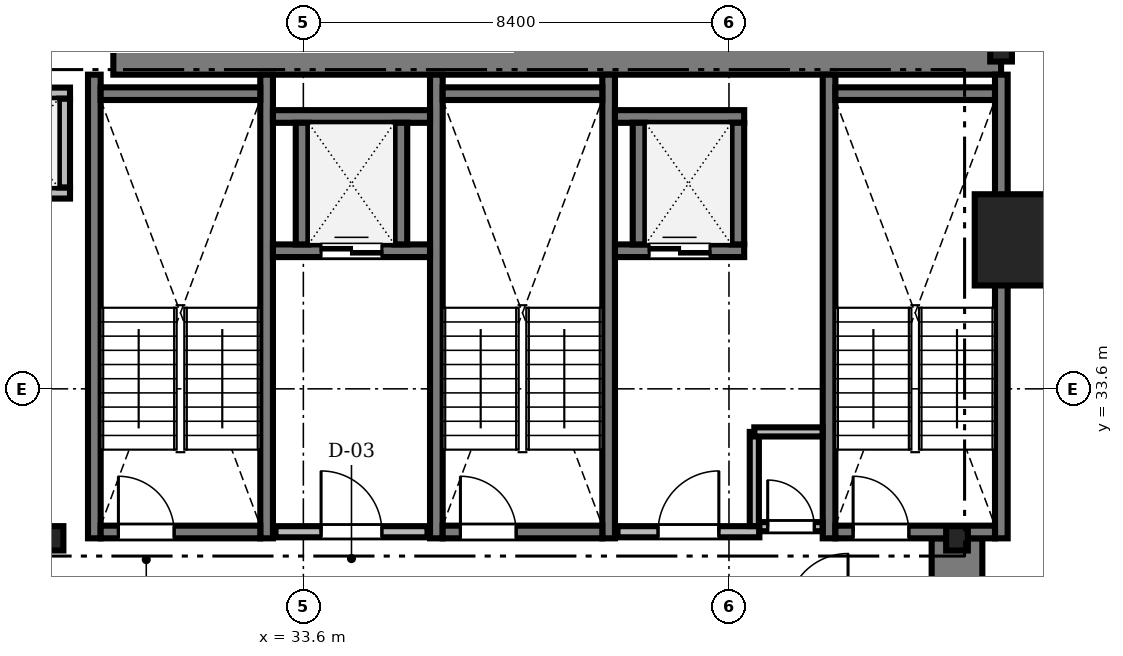
"""IFC4 building model, lengths in metres.
Left out: names, types, materials, properties, quantities, classifications, styles, units other than length and angle.
Written with IfcOpenShell. Run it as: python <this file> out.ifc"""

import sys

from ifc_helpers import new_model, si_unit, direction, frame, frame_2d, origin, origin_2d, place, context, subcontext, project, spatial, rectangle, i_section, extrude, source, transform, mapped, element, fill, save


model = new_model("IFC4")
c1 = context("Model", 3, precision=1e-05, world=origin(), true_north=direction((0.0, 1.0)))
c2 = subcontext(c1, "Body", "Model", "MODEL_VIEW")
j1 = project(units=[si_unit("LENGTHUNIT", "METRE"), si_unit("PLANEANGLEUNIT", "RADIAN")], contexts=[c1])
p1 = place(None, origin())
s1 = spatial("IfcSite", under=j1, at=p1, CompositionType="ELEMENT")
p2 = place(p1, origin())
s2 = spatial("IfcBuilding", under=s1, at=p2, CompositionType="ELEMENT")
p3 = place(p2, frame((0.0, 0.0, 45.85)))
s3 = spatial("IfcBuildingStorey", under=s2, at=p3, CompositionType="ELEMENT", Elevation=45.85)
m1 = source(origin(), c2, "Body", "SweptSolid", [
    extrude(rectangle(XDim=17.52, YDim=1.0, at=frame_2d((8.76, 0.0))), origin(), (0.0, 0.0, 1.0), 3.41),
])
p4 = place(p3, frame((29.85, 40.3, 0.0), z_axis=(0.0, 0.0, 1.0), x_axis=(1.0, 0.0, 0.0)))
e1 = element("IfcWall", 1, at=p4, inside=s3, PredefinedType="SHEAR", context=c2, shape_type="MappedRepresentation", body=[
    mapped(m1, transform((0.0, 0.0, 0.0), scale=1.0)),
])
m2 = source(origin(), c2, "Body", "SweptSolid", [
    extrude(rectangle(XDim=13.15, YDim=1.0, at=frame_2d((6.575, 0.0))), origin(), (0.0, 0.0, 1.0), 3.41),
])
p5 = place(p3, frame((46.5, 17.5, 0.0), z_axis=(0.0, 0.0, 1.0), x_axis=(0.0, 1.0, 0.0)))
e2 = element("IfcWall", 2, at=p5, inside=s3, PredefinedType="SHEAR", context=c2, shape_type="MappedRepresentation", body=[
    mapped(m2, transform((0.0, 0.0, 0.0), scale=1.0)),
])
m3 = source(origin(), c2, "Body", "SweptSolid", [
    extrude(i_section(OverallWidth=0.428, OverallDepth=0.481, WebThickness=0.04, FlangeThickness=0.063, FilletRadius=0.015, at=origin_2d()), origin(), (0.0, 0.0, 1.0), 3.41),
])
for number, where, z_axis, x_axis in (
    (3, (28.65, 30.65, 0.0), (0.0, 0.0, 1.0), (1.0, 0.0, 0.0)),
    (4, (46.5, 30.65, 0.0), (0.0, 0.0, 1.0), (1.0, 0.0, 0.0)),
    (5, (47.37, 40.3, 0.0), (0.0, 0.0, 1.0), (1.0, 0.0, 0.0)),
):
    element("IfcColumn", number, at=place(p3, frame(where, z_axis=z_axis, x_axis=x_axis)), inside=s3, PredefinedType="COLUMN", context=c2, shape_type="MappedRepresentation", body=[
        mapped(m3, transform((0.0, 0.0, 0.0), scale=1.0)),
    ])
m4 = source(origin(), c2, "Body", "SweptSolid", [
    extrude(rectangle(XDim=1.8, YDim=1.8, at=origin_2d()), origin(), (0.0, 0.0, 1.0), 3.41),
])
p6 = place(p3, frame((47.75, 36.54, 0.0), z_axis=(0.0, 0.0, 1.0), x_axis=(1.0, 0.0, 0.0)))
e6 = element("IfcColumn", 6, at=p6, inside=s3, PredefinedType="COLUMN", context=c2, shape_type="MappedRepresentation", body=[
    mapped(m4, transform((0.0, 0.0, 0.0), scale=1.0)),
])
m5 = source(origin(), c2, "Body", "SweptSolid", [
    extrude(rectangle(XDim=9.15, YDim=0.25, at=frame_2d((4.575, 0.0))), origin(), (0.0, 0.0, 1.0), 3.45),
])
for number, where, z_axis, x_axis in (
    (7, (29.475, 30.65, 0.0), (0.0, 0.0, 1.0), (0.0, 1.0, 0.0)),
    (8, (32.875, 30.65, 0.0), (0.0, 0.0, 1.0), (0.0, 1.0, 0.0)),
):
    element("IfcWall", number, at=place(p3, frame(where, z_axis=z_axis, x_axis=x_axis)), inside=s3, PredefinedType="SOLIDWALL", context=c2, shape_type="MappedRepresentation", body=[
        mapped(m5, transform((0.0, 0.0, 0.0), scale=1.0)),
    ])
m6 = source(origin(), c2, "Body", "SweptSolid", [
    extrude(rectangle(XDim=3.15, YDim=0.25, at=frame_2d((1.575, 0.0))), origin(), (0.0, 0.0, 1.0), 3.45),
])
p7 = place(p3, frame((29.6, 39.425, 0.0), z_axis=(0.0, 0.0, 1.0), x_axis=(1.0, 0.0, 0.0)))
e9 = element("IfcWall", 9, at=p7, inside=s3, PredefinedType="SOLIDWALL", context=c2, shape_type="MappedRepresentation", body=[
    mapped(m6, transform((0.0, 0.0, 0.0), scale=1.0)),
])
p8 = place(p3, frame((29.6, 30.775, 0.0), z_axis=(0.0, 0.0, 1.0), x_axis=(1.0, 0.0, 0.0)))
e10 = element("IfcWall", 10, at=p8, inside=s3, PredefinedType="SOLIDWALL", context=c2, shape_type="MappedRepresentation", body=[
    mapped(m6, transform((0.0, 0.0, 0.0), scale=1.0)),
])
m7 = source(origin(), c2, "Body", "SweptSolid", [
    extrude(rectangle(XDim=1.1, YDim=2.2, at=frame_2d((0.55, 1.1))), frame((0.0, 0.135, 0.0), z_axis=(0.0, -1.0, 0.0), x_axis=(1.0, 0.0, 0.0)), (0.0, 0.0, 1.0), 0.27),
])
p9 = place(p8, frame((0.35, 0.0, 0.0)))
e11 = element("IfcOpeningElement", 11, at=p9, cuts=e10, PredefinedType="OPENING", context=c2, shape_type="MappedRepresentation", body=[
    mapped(m7, transform((0.0, 0.0, 0.0), scale=1.0)),
])
for number, where, z_axis, x_axis in (
    (12, (36.225, 30.65, 0.0), (0.0, 0.0, 1.0), (0.0, 1.0, 0.0)),
    (13, (39.625, 30.65, 0.0), (0.0, 0.0, 1.0), (0.0, 1.0, 0.0)),
):
    element("IfcWall", number, at=place(p3, frame(where, z_axis=z_axis, x_axis=x_axis)), inside=s3, PredefinedType="SOLIDWALL", context=c2, shape_type="MappedRepresentation", body=[
        mapped(m5, transform((0.0, 0.0, 0.0), scale=1.0)),
    ])
p10 = place(p3, frame((36.35, 39.425, 0.0), z_axis=(0.0, 0.0, 1.0), x_axis=(1.0, 0.0, 0.0)))
e14 = element("IfcWall", 14, at=p10, inside=s3, PredefinedType="SOLIDWALL", context=c2, shape_type="MappedRepresentation", body=[
    mapped(m6, transform((0.0, 0.0, 0.0), scale=1.0)),
])
p11 = place(p3, frame((36.35, 30.775, 0.0), z_axis=(0.0, 0.0, 1.0), x_axis=(1.0, 0.0, 0.0)))
e15 = element("IfcWall", 15, at=p11, inside=s3, PredefinedType="SOLIDWALL", context=c2, shape_type="MappedRepresentation", body=[
    mapped(m6, transform((0.0, 0.0, 0.0), scale=1.0)),
])
p12 = place(p11, frame((0.35, 0.0, 0.0)))
e16 = element("IfcOpeningElement", 16, at=p12, cuts=e15, PredefinedType="OPENING", context=c2, shape_type="MappedRepresentation", body=[
    mapped(m7, transform((0.0, 0.0, 0.0), scale=1.0)),
])
for number, where, z_axis, x_axis in (
    (17, (43.975, 30.65, 0.0), (0.0, 0.0, 1.0), (0.0, 1.0, 0.0)),
    (18, (47.375, 30.65, 0.0), (0.0, 0.0, 1.0), (0.0, 1.0, 0.0)),
):
    element("IfcWall", number, at=place(p3, frame(where, z_axis=z_axis, x_axis=x_axis)), inside=s3, PredefinedType="SOLIDWALL", context=c2, shape_type="MappedRepresentation", body=[
        mapped(m5, transform((0.0, 0.0, 0.0), scale=1.0)),
    ])
p13 = place(p3, frame((44.1, 39.425, 0.0), z_axis=(0.0, 0.0, 1.0), x_axis=(1.0, 0.0, 0.0)))
e19 = element("IfcWall", 19, at=p13, inside=s3, PredefinedType="SOLIDWALL", context=c2, shape_type="MappedRepresentation", body=[
    mapped(m6, transform((0.0, 0.0, 0.0), scale=1.0)),
])
p14 = place(p3, frame((44.1, 30.775, 0.0), z_axis=(0.0, 0.0, 1.0), x_axis=(1.0, 0.0, 0.0)))
e20 = element("IfcWall", 20, at=p14, inside=s3, PredefinedType="SOLIDWALL", context=c2, shape_type="MappedRepresentation", body=[
    mapped(m6, transform((0.0, 0.0, 0.0), scale=1.0)),
])
p15 = place(p14, frame((0.35, 0.0, 0.0)))
e21 = element("IfcOpeningElement", 21, at=p15, cuts=e20, PredefinedType="OPENING", context=c2, shape_type="MappedRepresentation", body=[
    mapped(m7, transform((0.0, 0.0, 0.0), scale=1.0)),
])
m8 = source(origin(), c2, "Body", "SweptSolid", [
    extrude(rectangle(XDim=3.0, YDim=0.22, at=frame_2d((1.5, 0.0))), origin(), (0.0, 0.0, 1.0), 3.41),
])
p16 = place(p3, frame((33.05, 30.78, 0.0), z_axis=(0.0, 0.0, 1.0), x_axis=(1.0, 0.0, 0.0)))
e22 = element("IfcWall", 22, at=p16, inside=s3, PredefinedType="SOLIDWALL", context=c2, shape_type="MappedRepresentation", body=[
    mapped(m8, transform((0.0, 0.0, 0.0), scale=1.0)),
])
m9 = source(origin(), c2, "Body", "SweptSolid", [
    extrude(rectangle(XDim=1.2, YDim=2.2, at=frame_2d((0.6, 1.1))), frame((0.0, 0.12, 0.0), z_axis=(0.0, -1.0, 0.0), x_axis=(1.0, 0.0, 0.0)), (0.0, 0.0, 1.0), 0.24),
])
p17 = place(p16, frame((0.9, 0.0, 0.0)))
e23 = element("IfcOpeningElement", 23, at=p17, cuts=e22, PredefinedType="OPENING", context=c2, shape_type="MappedRepresentation", body=[
    mapped(m9, transform((0.0, 0.0, 0.0), scale=1.0)),
])
m10 = source(origin(), c2, "Body", "SweptSolid", [
    extrude(rectangle(XDim=2.8, YDim=0.22, at=frame_2d((1.4, 0.0))), origin(), (0.0, 0.0, 1.0), 3.41),
])
p18 = place(p3, frame((39.8, 30.78, 0.0), z_axis=(0.0, 0.0, 1.0), x_axis=(1.0, 0.0, 0.0)))
e24 = element("IfcWall", 24, at=p18, inside=s3, PredefinedType="SOLIDWALL", context=c2, shape_type="MappedRepresentation", body=[
    mapped(m10, transform((0.0, 0.0, 0.0), scale=1.0)),
])
p19 = place(p18, frame((0.8, 0.0, 0.0)))
e25 = element("IfcOpeningElement", 25, at=p19, cuts=e24, PredefinedType="OPENING", context=c2, shape_type="MappedRepresentation", body=[
    mapped(m9, transform((0.0, 0.0, 0.0), scale=1.0)),
])
m11 = source(origin(), c2, "Body", "SweptSolid", [
    extrude(rectangle(XDim=1.99, YDim=0.22, at=frame_2d((0.995, 0.0))), origin(), (0.0, 0.0, 1.0), 3.41),
])
p20 = place(p3, frame((27.005, 37.465, 0.0), z_axis=(0.0, 0.0, 1.0), x_axis=(1.0, 0.0, 0.0)))
e26 = element("IfcWall", 26, at=p20, inside=s3, PredefinedType="SOLIDWALL", context=c2, shape_type="MappedRepresentation", body=[
    mapped(m11, transform((0.0, 0.0, 0.0), scale=1.0)),
])
m12 = source(origin(), c2, "Body", "SweptSolid", [
    extrude(rectangle(XDim=1.1, YDim=2.2, at=frame_2d((0.55, 1.1))), frame((0.0, 0.12, 0.0), z_axis=(0.0, -1.0, 0.0), x_axis=(1.0, 0.0, 0.0)), (0.0, 0.0, 1.0), 0.24),
])
p21 = place(p20, frame((0.445, 0.0, 0.0)))
e27 = element("IfcOpeningElement", 27, at=p21, cuts=e26, PredefinedType="OPENING", context=c2, shape_type="MappedRepresentation", body=[
    mapped(m12, transform((0.0, 0.0, 0.0), scale=1.0)),
])
p22 = place(p3, frame((27.005, 39.435, 0.0), z_axis=(0.0, 0.0, 1.0), x_axis=(1.0, 0.0, 0.0)))
e28 = element("IfcWall", 28, at=p22, inside=s3, PredefinedType="SOLIDWALL", context=c2, shape_type="MappedRepresentation", body=[
    mapped(m11, transform((0.0, 0.0, 0.0), scale=1.0)),
])
m13 = source(origin(), c2, "Body", "SweptSolid", [
    extrude(rectangle(XDim=1.75, YDim=0.22, at=frame_2d((0.875, 0.0))), origin(), (0.0, 0.0, 1.0), 3.41),
])
p23 = place(p3, frame((28.885, 37.575, 0.0), z_axis=(0.0, 0.0, 1.0), x_axis=(0.0, 1.0, 0.0)))
e29 = element("IfcWall", 29, at=p23, inside=s3, PredefinedType="SOLIDWALL", context=c2, shape_type="MappedRepresentation", body=[
    mapped(m13, transform((0.0, 0.0, 0.0), scale=1.0)),
])
m14 = source(origin(), c2, "Body", "SweptSolid", [
    extrude(rectangle(XDim=3.1, YDim=0.25, at=frame_2d((1.55, 0.0))), origin(), (0.0, 0.0, 1.0), 3.41),
])
p24 = place(p3, frame((33.0, 36.325, 0.0), z_axis=(0.0, 0.0, 1.0), x_axis=(1.0, 0.0, 0.0)))
e30 = element("IfcWall", 30, at=p24, inside=s3, PredefinedType="SOLIDWALL", context=c2, shape_type="MappedRepresentation", body=[
    mapped(m14, transform((0.0, 0.0, 0.0), scale=1.0)),
])
m15 = source(origin(), c2, "Body", "SweptSolid", [
    extrude(rectangle(XDim=1.2, YDim=2.25, at=frame_2d((0.6, 1.125))), frame((0.0, 0.135, 0.0), z_axis=(0.0, -1.0, 0.0), x_axis=(1.0, 0.0, 0.0)), (0.0, 0.0, 1.0), 0.27),
])
p25 = place(p24, frame((0.95, 0.0, 0.0)))
e31 = element("IfcOpeningElement", 31, at=p25, cuts=e30, PredefinedType="OPENING", context=c2, shape_type="MappedRepresentation", body=[
    mapped(m15, transform((0.0, 0.0, 0.0), scale=1.0)),
])
p26 = place(p3, frame((33.0, 38.975, 0.0), z_axis=(0.0, 0.0, 1.0), x_axis=(1.0, 0.0, 0.0)))
e32 = element("IfcWall", 32, at=p26, inside=s3, PredefinedType="SOLIDWALL", context=c2, shape_type="MappedRepresentation", body=[
    mapped(m14, transform((0.0, 0.0, 0.0), scale=1.0)),
])
m16 = source(origin(), c2, "Body", "SweptSolid", [
    extrude(rectangle(XDim=2.4, YDim=0.25, at=frame_2d((1.2, 0.0))), origin(), (0.0, 0.0, 1.0), 3.41),
])
for number, where, z_axis, x_axis in (
    (33, (33.575, 36.45, 0.0), (0.0, 0.0, 1.0), (0.0, 1.0, 0.0)),
    (34, (35.525, 36.45, 0.0), (0.0, 0.0, 1.0), (0.0, 1.0, 0.0)),
):
    element("IfcWall", number, at=place(p3, frame(where, z_axis=z_axis, x_axis=x_axis)), inside=s3, PredefinedType="SOLIDWALL", context=c2, shape_type="MappedRepresentation", body=[
        mapped(m16, transform((0.0, 0.0, 0.0), scale=1.0)),
    ])
m17 = source(origin(), c2, "Body", "SweptSolid", [
    extrude(rectangle(XDim=2.55, YDim=0.25, at=frame_2d((1.275, 0.0))), origin(), (0.0, 0.0, 1.0), 3.41),
])
p27 = place(p3, frame((39.75, 36.325, 0.0), z_axis=(0.0, 0.0, 1.0), x_axis=(1.0, 0.0, 0.0)))
e35 = element("IfcWall", 35, at=p27, inside=s3, PredefinedType="SOLIDWALL", context=c2, shape_type="MappedRepresentation", body=[
    mapped(m17, transform((0.0, 0.0, 0.0), scale=1.0)),
])
p28 = place(p27, frame((0.675, 0.0, 0.0)))
e36 = element("IfcOpeningElement", 36, at=p28, cuts=e35, PredefinedType="OPENING", context=c2, shape_type="MappedRepresentation", body=[
    mapped(m15, transform((0.0, 0.0, 0.0), scale=1.0)),
])
p29 = place(p3, frame((39.75, 38.975, 0.0), z_axis=(0.0, 0.0, 1.0), x_axis=(1.0, 0.0, 0.0)))
e37 = element("IfcWall", 37, at=p29, inside=s3, PredefinedType="SOLIDWALL", context=c2, shape_type="MappedRepresentation", body=[
    mapped(m17, transform((0.0, 0.0, 0.0), scale=1.0)),
])
for number, where, z_axis, x_axis in (
    (38, (40.225, 36.45, 0.0), (0.0, 0.0, 1.0), (0.0, 1.0, 0.0)),
    (39, (42.175, 36.45, 0.0), (0.0, 0.0, 1.0), (0.0, 1.0, 0.0)),
):
    element("IfcWall", number, at=place(p3, frame(where, z_axis=z_axis, x_axis=x_axis)), inside=s3, PredefinedType="SOLIDWALL", context=c2, shape_type="MappedRepresentation", body=[
        mapped(m16, transform((0.0, 0.0, 0.0), scale=1.0)),
    ])
m18 = source(origin(), c2, "Body", "SweptSolid", [
    extrude(rectangle(XDim=1.248, YDim=0.18, at=frame_2d((0.624, 0.0))), origin(), (0.0, 0.0, 1.0), 3.41),
])
p30 = place(p3, frame((42.6, 30.88, 0.0), z_axis=(0.0, 0.0, 1.0), x_axis=(1.0, 0.0, 0.0)))
e40 = element("IfcWall", 40, at=p30, inside=s3, PredefinedType="PARTITIONING", context=c2, shape_type="MappedRepresentation", body=[
    mapped(m18, transform((0.0, 0.0, 0.0), scale=1.0)),
])
m19 = source(origin(), c2, "Body", "SweptSolid", [
    extrude(rectangle(XDim=0.92, YDim=2.1, at=frame_2d((0.46, 1.05))), frame((0.0, 0.1, 0.0), z_axis=(0.0, -1.0, 0.0), x_axis=(1.0, 0.0, 0.0)), (0.0, 0.0, 1.0), 0.2),
])
p31 = place(p30, frame((0.164, 0.0, 0.0)))
e41 = element("IfcOpeningElement", 41, at=p31, cuts=e40, PredefinedType="OPENING", context=c2, shape_type="MappedRepresentation", body=[
    mapped(m19, transform((0.0, 0.0, 0.0), scale=1.0)),
])
m20 = source(origin(), c2, "Body", "SweptSolid", [
    extrude(rectangle(XDim=1.858, YDim=0.18, at=frame_2d((0.929, 0.0))), origin(), (0.0, 0.0, 1.0), 3.41),
])
p32 = place(p3, frame((42.5, 30.892, 0.0), z_axis=(0.0, 0.0, 1.0), x_axis=(0.0, 1.0, 0.0)))
e42 = element("IfcWall", 42, at=p32, inside=s3, PredefinedType="PARTITIONING", context=c2, shape_type="MappedRepresentation", body=[
    mapped(m20, transform((0.0, 0.0, 0.0), scale=1.0)),
])
m21 = source(origin(), c2, "Body", "SweptSolid", [
    extrude(rectangle(XDim=1.348, YDim=0.18, at=frame_2d((0.674, 0.0))), origin(), (0.0, 0.0, 1.0), 3.41),
])
p33 = place(p3, frame((42.5, 32.75, 0.0), z_axis=(0.0, 0.0, 1.0), x_axis=(1.0, 0.0, 0.0)))
e43 = element("IfcWall", 43, at=p33, inside=s3, PredefinedType="PARTITIONING", context=c2, shape_type="MappedRepresentation", body=[
    mapped(m21, transform((0.0, 0.0, 0.0), scale=1.0)),
])
m22 = source(origin(), c2, "Body", "SweptSolid", [
    extrude(rectangle(XDim=1.1, YDim=2.2, at=frame_2d((0.55, 1.1))), frame((0.0, 0.025, 0.0), z_axis=(0.0, -1.0, 0.0), x_axis=(1.0, 0.0, 0.0)), (0.0, 0.0, 1.0), 0.05),
])
p34 = place(p9, origin())
e44 = element("IfcDoor", 44, at=p34, inside=s3, OperationType="SINGLE_SWING_LEFT", PredefinedType="DOOR", context=c2, shape_type="MappedRepresentation", body=[
    mapped(m22, transform((0.0, 0.0, 0.0), scale=1.0)),
])
fill(e11, e44)
p35 = place(p12, origin())
e45 = element("IfcDoor", 45, at=p35, inside=s3, OperationType="SINGLE_SWING_LEFT", PredefinedType="DOOR", context=c2, shape_type="MappedRepresentation", body=[
    mapped(m22, transform((0.0, 0.0, 0.0), scale=1.0)),
])
fill(e16, e45)
p36 = place(p15, origin())
e46 = element("IfcDoor", 46, at=p36, inside=s3, OperationType="SINGLE_SWING_LEFT", PredefinedType="DOOR", context=c2, shape_type="MappedRepresentation", body=[
    mapped(m22, transform((0.0, 0.0, 0.0), scale=1.0)),
])
fill(e21, e46)
m23 = source(origin(), c2, "Body", "SweptSolid", [
    extrude(rectangle(XDim=1.2, YDim=2.2, at=frame_2d((0.6, 1.1))), frame((0.0, 0.025, 0.0), z_axis=(0.0, -1.0, 0.0), x_axis=(1.0, 0.0, 0.0)), (0.0, 0.0, 1.0), 0.05),
])
p37 = place(p17, origin())
e47 = element("IfcDoor", 47, at=p37, inside=s3, OperationType="SINGLE_SWING_LEFT", PredefinedType="DOOR", context=c2, shape_type="MappedRepresentation", body=[
    mapped(m23, transform((0.0, 0.0, 0.0), scale=1.0)),
])
fill(e23, e47)
p38 = place(p19, origin())
e48 = element("IfcDoor", 48, at=p38, inside=s3, OperationType="SINGLE_SWING_RIGHT", PredefinedType="DOOR", context=c2, shape_type="MappedRepresentation", body=[
    mapped(m23, transform((0.0, 0.0, 0.0), scale=1.0)),
])
fill(e25, e48)
m24 = source(origin(), c2, "Body", "SweptSolid", [
    extrude(rectangle(XDim=1.2, YDim=2.25, at=frame_2d((0.6, 1.125))), frame((0.0, 0.025, 0.0), z_axis=(0.0, -1.0, 0.0), x_axis=(1.0, 0.0, 0.0)), (0.0, 0.0, 1.0), 0.05),
])
p39 = place(p25, origin())
e49 = element("IfcDoor", 49, at=p39, inside=s3, OperationType="DOUBLE_DOOR_SLIDING", PredefinedType="DOOR", context=c2, shape_type="MappedRepresentation", body=[
    mapped(m24, transform((0.0, 0.0, 0.0), scale=1.0)),
])
fill(e31, e49)
p40 = place(p28, origin())
e50 = element("IfcDoor", 50, at=p40, inside=s3, OperationType="DOUBLE_DOOR_SLIDING", PredefinedType="DOOR", context=c2, shape_type="MappedRepresentation", body=[
    mapped(m24, transform((0.0, 0.0, 0.0), scale=1.0)),
])
fill(e36, e50)
m25 = source(origin(), c2, "Body", "SweptSolid", [
    extrude(rectangle(XDim=0.92, YDim=2.1, at=frame_2d((0.46, 1.05))), frame((0.0, 0.025, 0.0), z_axis=(0.0, -1.0, 0.0), x_axis=(1.0, 0.0, 0.0)), (0.0, 0.0, 1.0), 0.05),
])
p41 = place(p31, origin())
e51 = element("IfcDoor", 51, at=p41, inside=s3, OperationType="SINGLE_SWING_LEFT", PredefinedType="DOOR", context=c2, shape_type="MappedRepresentation", body=[
    mapped(m25, transform((0.0, 0.0, 0.0), scale=1.0)),
])
fill(e41, e51)
save(model, sys.argv[1])
